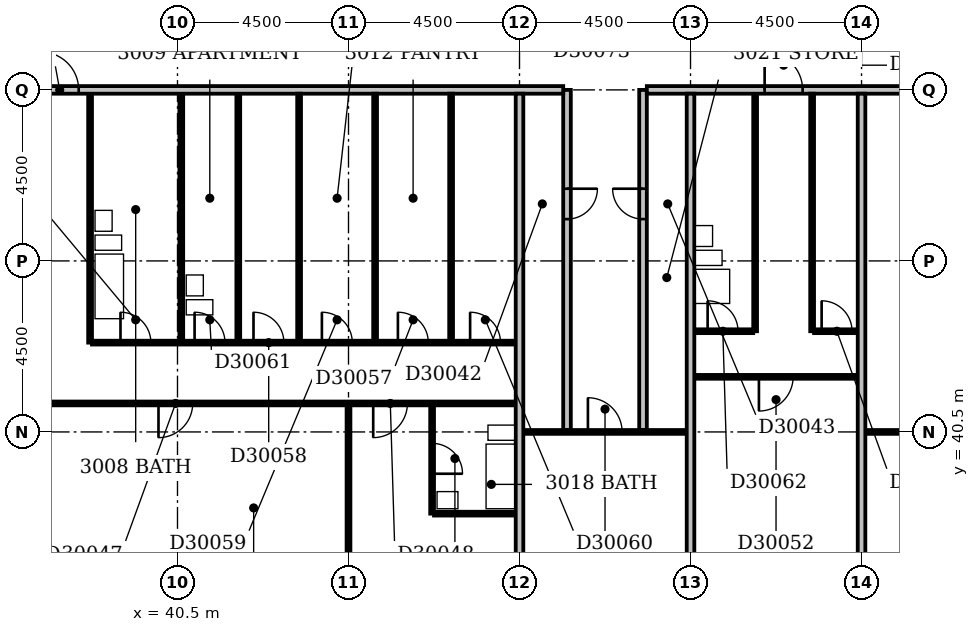
"""IFC4 building model, lengths in metres.
Left out: names, types, materials, properties, quantities, classifications, styles, units other than length and angle.
Written with IfcOpenShell. Run it as: python <this file> out.ifc"""

import sys

from ifc_helpers import new_model, si_unit, direction, frame, frame_2d, origin, place, context, subcontext, project, spatial, rectangle, extrude, element, fill, save


model = new_model("IFC4")
c1 = context("Model", 3, precision=1e-05, world=origin(), true_north=direction((0.0, 1.0)))
c2 = subcontext(c1, "Body", "Model", "MODEL_VIEW")
j1 = project(units=[si_unit("LENGTHUNIT", "METRE"), si_unit("PLANEANGLEUNIT", "RADIAN")], contexts=[c1])
p1 = place(None, origin())
s1 = spatial("IfcSite", under=j1, at=p1, CompositionType="ELEMENT")
p2 = place(p1, origin())
s2 = spatial("IfcBuilding", under=s1, at=p2, CompositionType="ELEMENT")
p3 = place(p2, frame((0.0, 0.0, 123.2)))
s3 = spatial("IfcBuildingStorey", under=s2, at=p3, CompositionType="ELEMENT", Elevation=123.2)
p4 = place(p3, frame((45.0, 36.5, 0.0), z_axis=(0.0, 0.0, 1.0), x_axis=(0.0, 1.0, 0.0)))
e1 = element("IfcWall", 1, at=p4, inside=s3, PredefinedType="PARTITIONING", context=c2, shape_type="SweptSolid", body=[
    extrude(rectangle(XDim=4.7, YDim=0.1, at=frame_2d((2.35, 0.0))), origin(), (0.0, 0.0, 1.0), 2.6),
])
p5 = place(p3, frame((49.5, 36.5, 0.0), z_axis=(0.0, 0.0, 1.0), x_axis=(0.0, 1.0, 0.0)))
e2 = element("IfcWall", 2, at=p5, inside=s3, PredefinedType="PARTITIONING", context=c2, shape_type="SweptSolid", body=[
    extrude(rectangle(XDim=12.9, YDim=0.2, at=frame_2d((6.45, 0.0))), origin(), (0.0, 0.0, 1.0), 3.3),
])
p6 = place(p3, frame((54.0, 36.5, 0.0), z_axis=(0.0, 0.0, 1.0), x_axis=(0.0, 1.0, 0.0)))
e3 = element("IfcWall", 3, at=p6, inside=s3, PredefinedType="PARTITIONING", context=c2, shape_type="SweptSolid", body=[
    extrude(rectangle(XDim=12.9, YDim=0.2, at=frame_2d((6.45, 0.0))), origin(), (0.0, 0.0, 1.0), 2.6),
])
p7 = place(p3, frame((58.5, 36.5, 0.0), z_axis=(0.0, 0.0, 1.0), x_axis=(0.0, 1.0, 0.0)))
e4 = element("IfcWall", 4, at=p7, inside=s3, PredefinedType="PARTITIONING", context=c2, shape_type="SweptSolid", body=[
    extrude(rectangle(XDim=12.9, YDim=0.2, at=frame_2d((6.45, 0.0))), origin(), (0.0, 0.0, 1.0), 3.3),
])
p8 = place(p3, frame((47.2, 38.35, 0.0), z_axis=(0.0, 0.0, 1.0), x_axis=(0.0, 1.0, 0.0)))
e5 = element("IfcWall", 5, at=p8, inside=s3, PredefinedType="PLUMBINGWALL", context=c2, shape_type="SweptSolid", body=[
    extrude(rectangle(XDim=2.85, YDim=0.1, at=frame_2d((1.425, 0.0))), origin(), (0.0, 0.0, 1.0), 3.3),
])
p9 = place(p8, frame((1.05, 0.0, 0.0)))
e6 = element("IfcOpeningElement", 6, at=p9, cuts=e5, PredefinedType="OPENING", context=c2, shape_type="SweptSolid", body=[
    extrude(rectangle(XDim=0.8, YDim=2.1, at=frame_2d((0.4, 1.05))), frame((0.0, 0.062, 0.0), z_axis=(0.0, -1.0, 0.0), x_axis=(1.0, 0.0, 0.0)), (0.0, 0.0, 1.0), 0.124),
])
p10 = place(p3, frame((47.25, 38.35, 0.0), z_axis=(0.0, 0.0, 1.0), x_axis=(1.0, 0.0, 0.0)))
e7 = element("IfcWall", 7, at=p10, inside=s3, PredefinedType="PLUMBINGWALL", context=c2, shape_type="SweptSolid", body=[
    extrude(rectangle(XDim=2.15, YDim=0.1, at=frame_2d((1.075, 0.0))), origin(), (0.0, 0.0, 1.0), 3.3),
])
p11 = place(p3, frame((49.6, 40.5, 0.0), z_axis=(0.0, 0.0, 1.0), x_axis=(1.0, 0.0, 0.0)))
e8 = element("IfcWall", 8, at=p11, inside=s3, PredefinedType="PARTITIONING", context=c2, shape_type="SweptSolid", body=[
    extrude(rectangle(XDim=4.3, YDim=0.1, at=frame_2d((2.15, 0.0))), origin(), (0.0, 0.0, 1.0), 3.3),
])
p12 = place(p11, frame((1.7, 0.0, 0.0)))
e9 = element("IfcOpeningElement", 9, at=p12, cuts=e8, PredefinedType="OPENING", context=c2, shape_type="SweptSolid", body=[
    extrude(rectangle(XDim=0.9, YDim=2.1, at=frame_2d((0.45, 1.05))), frame((0.0, 0.062, 0.0), z_axis=(0.0, -1.0, 0.0), x_axis=(1.0, 0.0, 0.0)), (0.0, 0.0, 1.0), 0.124),
])
p13 = place(p3, frame((58.6, 40.5, 0.0), z_axis=(0.0, 0.0, 1.0), x_axis=(1.0, 0.0, 0.0)))
e10 = element("IfcWall", 10, at=p13, inside=s3, PredefinedType="PARTITIONING", context=c2, shape_type="SweptSolid", body=[
    extrude(rectangle(XDim=4.3, YDim=0.1, at=frame_2d((2.15, 0.0))), origin(), (0.0, 0.0, 1.0), 3.3),
])
p14 = place(p13, frame((1.7, 0.0, 0.0)))
e11 = element("IfcOpeningElement", 11, at=p14, cuts=e10, PredefinedType="OPENING", context=c2, shape_type="SweptSolid", body=[
    extrude(rectangle(XDim=0.9, YDim=2.1, at=frame_2d((0.45, 1.05))), frame((0.0, 0.062, 0.0), z_axis=(0.0, -1.0, 0.0), x_axis=(1.0, 0.0, 0.0)), (0.0, 0.0, 1.0), 0.124),
])
p15 = place(p3, frame((50.75, 40.55, 0.0), z_axis=(0.0, 0.0, 1.0), x_axis=(0.0, 1.0, 0.0)))
e12 = element("IfcWall", 12, at=p15, inside=s3, PredefinedType="PARTITIONING", context=c2, shape_type="SweptSolid", body=[
    extrude(rectangle(XDim=8.95, YDim=0.2, at=frame_2d((4.475, 0.0))), origin(), (0.0, 0.0, 1.0), 3.3),
])
p16 = place(p15, frame((5.55, 0.0, 0.0)))
e13 = element("IfcOpeningElement", 13, at=p16, cuts=e12, PredefinedType="OPENING", context=c2, shape_type="SweptSolid", body=[
    extrude(rectangle(XDim=0.8, YDim=2.1, at=frame_2d((0.4, 1.05))), frame((0.0, 0.112, 0.0), z_axis=(0.0, -1.0, 0.0), x_axis=(1.0, 0.0, 0.0)), (0.0, 0.0, 1.0), 0.224),
])
p17 = place(p3, frame((52.75, 40.55, 0.0), z_axis=(0.0, 0.0, 1.0), x_axis=(0.0, 1.0, 0.0)))
e14 = element("IfcWall", 14, at=p17, inside=s3, PredefinedType="PARTITIONING", context=c2, shape_type="SweptSolid", body=[
    extrude(rectangle(XDim=8.95, YDim=0.2, at=frame_2d((4.475, 0.0))), origin(), (0.0, 0.0, 1.0), 3.3),
])
p18 = place(p17, frame((5.55, 0.0, 0.0)))
e15 = element("IfcOpeningElement", 15, at=p18, cuts=e14, PredefinedType="OPENING", context=c2, shape_type="SweptSolid", body=[
    extrude(rectangle(XDim=0.8, YDim=2.1, at=frame_2d((0.4, 1.05))), frame((0.0, 0.112, 0.0), z_axis=(0.0, -1.0, 0.0), x_axis=(1.0, 0.0, 0.0)), (0.0, 0.0, 1.0), 0.224),
])
p19 = place(p3, frame((31.6, 41.25, 0.0), z_axis=(0.0, 0.0, 1.0), x_axis=(1.0, 0.0, 0.0)))
e16 = element("IfcWall", 16, at=p19, inside=s3, PredefinedType="PARTITIONING", context=c2, shape_type="SweptSolid", body=[
    extrude(rectangle(XDim=17.8, YDim=0.1, at=frame_2d((8.9, 0.0))), origin(), (0.0, 0.0, 1.0), 3.3),
])
p20 = place(p19, frame((2.85, 0.0, 0.0)))
e17 = element("IfcOpeningElement", 17, at=p20, cuts=e16, PredefinedType="OPENING", context=c2, shape_type="SweptSolid", body=[
    extrude(rectangle(XDim=0.9, YDim=2.1, at=frame_2d((0.45, 1.05))), frame((0.0, 0.062, 0.0), z_axis=(0.0, -1.0, 0.0), x_axis=(1.0, 0.0, 0.0)), (0.0, 0.0, 1.0), 0.124),
])
p21 = place(p19, frame((8.4, 0.0, 0.0)))
e18 = element("IfcOpeningElement", 18, at=p21, cuts=e16, PredefinedType="OPENING", context=c2, shape_type="SweptSolid", body=[
    extrude(rectangle(XDim=0.9, YDim=2.1, at=frame_2d((0.45, 1.05))), frame((0.0, 0.062, 0.0), z_axis=(0.0, -1.0, 0.0), x_axis=(1.0, 0.0, 0.0)), (0.0, 0.0, 1.0), 0.124),
])
p22 = place(p19, frame((14.05, 0.0, 0.0)))
e19 = element("IfcOpeningElement", 19, at=p22, cuts=e16, PredefinedType="OPENING", context=c2, shape_type="SweptSolid", body=[
    extrude(rectangle(XDim=0.9, YDim=2.1, at=frame_2d((0.45, 1.05))), frame((0.0, 0.062, 0.0), z_axis=(0.0, -1.0, 0.0), x_axis=(1.0, 0.0, 0.0)), (0.0, 0.0, 1.0), 0.124),
])
p23 = place(p3, frame((54.1, 41.95, 0.0), z_axis=(0.0, 0.0, 1.0), x_axis=(1.0, 0.0, 0.0)))
e20 = element("IfcWall", 20, at=p23, inside=s3, PredefinedType="PARTITIONING", context=c2, shape_type="SweptSolid", body=[
    extrude(rectangle(XDim=4.3, YDim=0.1, at=frame_2d((2.15, 0.0))), origin(), (0.0, 0.0, 1.0), 3.3),
])
p24 = place(p23, frame((1.7, 0.0, 0.0)))
e21 = element("IfcOpeningElement", 21, at=p24, cuts=e20, PredefinedType="OPENING", context=c2, shape_type="SweptSolid", body=[
    extrude(rectangle(XDim=0.9, YDim=2.1, at=frame_2d((0.45, 1.05))), frame((0.0, 0.062, 0.0), z_axis=(0.0, -1.0, 0.0), x_axis=(1.0, 0.0, 0.0)), (0.0, 0.0, 1.0), 0.124),
])
p25 = place(p3, frame((38.2, 42.85, 0.0), z_axis=(0.0, 0.0, 1.0), x_axis=(0.0, 1.0, 0.0)))
e22 = element("IfcWall", 22, at=p25, inside=s3, PredefinedType="PLUMBINGWALL", context=c2, shape_type="SweptSolid", body=[
    extrude(rectangle(XDim=6.55, YDim=0.1, at=frame_2d((3.275, 0.0))), origin(), (0.0, 0.0, 1.0), 3.3),
])
p26 = place(p3, frame((38.25, 42.85, 0.0), z_axis=(0.0, 0.0, 1.0), x_axis=(1.0, 0.0, 0.0)))
e23 = element("IfcWall", 23, at=p26, inside=s3, PredefinedType="PARTITIONING", context=c2, shape_type="SweptSolid", body=[
    extrude(rectangle(XDim=11.15, YDim=0.1, at=frame_2d((5.575, 0.0))), origin(), (0.0, 0.0, 1.0), 3.3),
])
p27 = place(p26, frame((0.75, 0.0, 0.0)))
e24 = element("IfcOpeningElement", 24, at=p27, cuts=e23, PredefinedType="OPENING", context=c2, shape_type="SweptSolid", body=[
    extrude(rectangle(XDim=0.8, YDim=2.1, at=frame_2d((0.4, 1.05))), frame((0.0, 0.062, 0.0), z_axis=(0.0, -1.0, 0.0), x_axis=(1.0, 0.0, 0.0)), (0.0, 0.0, 1.0), 0.124),
])
p28 = place(p26, frame((8.05, 0.0, 0.0)))
e25 = element("IfcOpeningElement", 25, at=p28, cuts=e23, PredefinedType="OPENING", context=c2, shape_type="SweptSolid", body=[
    extrude(rectangle(XDim=0.8, YDim=2.1, at=frame_2d((0.4, 1.05))), frame((0.0, 0.062, 0.0), z_axis=(0.0, -1.0, 0.0), x_axis=(1.0, 0.0, 0.0)), (0.0, 0.0, 1.0), 0.124),
])
p29 = place(p26, frame((4.25, 0.0, 0.0)))
e26 = element("IfcOpeningElement", 26, at=p29, cuts=e23, PredefinedType="OPENING", context=c2, shape_type="SweptSolid", body=[
    extrude(rectangle(XDim=0.8, YDim=2.1, at=frame_2d((0.4, 1.05))), frame((0.0, 0.062, 0.0), z_axis=(0.0, -1.0, 0.0), x_axis=(1.0, 0.0, 0.0)), (0.0, 0.0, 1.0), 0.124),
])
p30 = place(p26, frame((6.05, 0.0, 0.0)))
e27 = element("IfcOpeningElement", 27, at=p30, cuts=e23, PredefinedType="OPENING", context=c2, shape_type="SweptSolid", body=[
    extrude(rectangle(XDim=0.8, YDim=2.1, at=frame_2d((0.4, 1.05))), frame((0.0, 0.062, 0.0), z_axis=(0.0, -1.0, 0.0), x_axis=(1.0, 0.0, 0.0)), (0.0, 0.0, 1.0), 0.124),
])
p31 = place(p26, frame((9.95, 0.0, 0.0)))
e28 = element("IfcOpeningElement", 28, at=p31, cuts=e23, PredefinedType="OPENING", context=c2, shape_type="SweptSolid", body=[
    extrude(rectangle(XDim=0.8, YDim=2.1, at=frame_2d((0.4, 1.05))), frame((0.0, 0.062, 0.0), z_axis=(0.0, -1.0, 0.0), x_axis=(1.0, 0.0, 0.0)), (0.0, 0.0, 1.0), 0.124),
])
p32 = place(p26, frame((2.7, 0.0, 0.0)))
e29 = element("IfcOpeningElement", 29, at=p32, cuts=e23, PredefinedType="OPENING", context=c2, shape_type="SweptSolid", body=[
    extrude(rectangle(XDim=0.8, YDim=2.1, at=frame_2d((0.4, 1.05))), frame((0.0, 0.062, 0.0), z_axis=(0.0, -1.0, 0.0), x_axis=(1.0, 0.0, 0.0)), (0.0, 0.0, 1.0), 0.124),
])
for number, where, z_axis, x_axis in (
    (30, (40.6, 42.9, 0.0), (0.0, 0.0, 1.0), (0.0, 1.0, 0.0)),
    (31, (42.1, 42.9, 0.0), (0.0, 0.0, 1.0), (0.0, 1.0, 0.0)),
):
    element("IfcWall", number, at=place(p3, frame(where, z_axis=z_axis, x_axis=x_axis)), inside=s3, PredefinedType="PLUMBINGWALL", context=c2, shape_type="SweptSolid", body=[
        extrude(rectangle(XDim=6.5, YDim=0.1, at=frame_2d((3.25, 0.0))), origin(), (0.0, 0.0, 1.0), 3.3),
    ])
p33 = place(p3, frame((43.7, 42.9, 0.0), z_axis=(0.0, 0.0, 1.0), x_axis=(0.0, 1.0, 0.0)))
e32 = element("IfcWall", 32, at=p33, inside=s3, PredefinedType="PARTITIONING", context=c2, shape_type="SweptSolid", body=[
    extrude(rectangle(XDim=6.5, YDim=0.1, at=frame_2d((3.25, 0.0))), origin(), (0.0, 0.0, 1.0), 3.3),
])
p34 = place(p3, frame((45.7, 42.9, 0.0), z_axis=(0.0, 0.0, 1.0), x_axis=(0.0, 1.0, 0.0)))
e33 = element("IfcWall", 33, at=p34, inside=s3, PredefinedType="PARTITIONING", context=c2, shape_type="SweptSolid", body=[
    extrude(rectangle(XDim=6.5, YDim=0.1, at=frame_2d((3.25, 0.0))), origin(), (0.0, 0.0, 1.0), 2.6),
])
p35 = place(p3, frame((47.7, 42.9, 0.0), z_axis=(0.0, 0.0, 1.0), x_axis=(0.0, 1.0, 0.0)))
e34 = element("IfcWall", 34, at=p35, inside=s3, PredefinedType="PARTITIONING", context=c2, shape_type="SweptSolid", body=[
    extrude(rectangle(XDim=6.5, YDim=0.1, at=frame_2d((3.25, 0.0))), origin(), (0.0, 0.0, 1.0), 3.3),
])
p36 = place(p3, frame((54.1, 43.15, 0.0), z_axis=(0.0, 0.0, 1.0), x_axis=(1.0, 0.0, 0.0)))
e35 = element("IfcWall", 35, at=p36, inside=s3, PredefinedType="PARTITIONING", context=c2, shape_type="SweptSolid", body=[
    extrude(rectangle(XDim=1.55, YDim=0.1, at=frame_2d((0.775, 0.0))), origin(), (0.0, 0.0, 1.0), 3.3),
])
p37 = place(p36, frame((0.35, 0.0, 0.0)))
e36 = element("IfcOpeningElement", 36, at=p37, cuts=e35, PredefinedType="OPENING", context=c2, shape_type="SweptSolid", body=[
    extrude(rectangle(XDim=0.8, YDim=2.1, at=frame_2d((0.4, 1.05))), frame((0.0, 0.062, 0.0), z_axis=(0.0, -1.0, 0.0), x_axis=(1.0, 0.0, 0.0)), (0.0, 0.0, 1.0), 0.124),
])
p38 = place(p3, frame((55.7, 43.15, 0.0), z_axis=(0.0, 0.0, 1.0), x_axis=(0.0, 1.0, 0.0)))
e37 = element("IfcWall", 37, at=p38, inside=s3, PredefinedType="PLUMBINGWALL", context=c2, shape_type="SweptSolid", body=[
    extrude(rectangle(XDim=6.25, YDim=0.1, at=frame_2d((3.125, 0.0))), origin(), (0.0, 0.0, 1.0), 3.3),
])
p39 = place(p3, frame((57.2, 43.15, 0.0), z_axis=(0.0, 0.0, 1.0), x_axis=(0.0, 1.0, 0.0)))
e38 = element("IfcWall", 38, at=p39, inside=s3, PredefinedType="PARTITIONING", context=c2, shape_type="SweptSolid", body=[
    extrude(rectangle(XDim=6.25, YDim=0.1, at=frame_2d((3.125, 0.0))), origin(), (0.0, 0.0, 1.0), 3.3),
])
p40 = place(p3, frame((57.25, 43.15, 0.0), z_axis=(0.0, 0.0, 1.0), x_axis=(1.0, 0.0, 0.0)))
e39 = element("IfcWall", 39, at=p40, inside=s3, PredefinedType="PARTITIONING", context=c2, shape_type="SweptSolid", body=[
    extrude(rectangle(XDim=1.15, YDim=0.1, at=frame_2d((0.575, 0.0))), origin(), (0.0, 0.0, 1.0), 3.3),
])
p41 = place(p40, frame((0.2, 0.0, 0.0)))
e40 = element("IfcOpeningElement", 40, at=p41, cuts=e39, PredefinedType="OPENING", context=c2, shape_type="SweptSolid", body=[
    extrude(rectangle(XDim=0.8, YDim=2.1, at=frame_2d((0.4, 1.05))), frame((0.0, 0.062, 0.0), z_axis=(0.0, -1.0, 0.0), x_axis=(1.0, 0.0, 0.0)), (0.0, 0.0, 1.0), 0.124),
])
p42 = place(p3, frame((9.1, 49.5, 0.0), z_axis=(0.0, 0.0, 1.0), x_axis=(1.0, 0.0, 0.0)))
e41 = element("IfcWall", 41, at=p42, inside=s3, PredefinedType="PARTITIONING", context=c2, shape_type="SweptSolid", body=[
    extrude(rectangle(XDim=41.55, YDim=0.2, at=frame_2d((20.775, 0.0))), origin(), (0.0, 0.0, 1.0), 3.3),
])
p43 = place(p42, frame((13.7, 0.0, 0.0)))
e42 = element("IfcOpeningElement", 42, at=p43, cuts=e41, PredefinedType="OPENING", context=c2, shape_type="SweptSolid", body=[
    extrude(rectangle(XDim=1.0, YDim=2.1, at=frame_2d((0.5, 1.05))), frame((0.0, 0.112, 0.0), z_axis=(0.0, -1.0, 0.0), x_axis=(1.0, 0.0, 0.0)), (0.0, 0.0, 1.0), 0.224),
])
p44 = place(p42, frame((27.8, 0.0, 0.0)))
e43 = element("IfcOpeningElement", 43, at=p44, cuts=e41, PredefinedType="OPENING", context=c2, shape_type="SweptSolid", body=[
    extrude(rectangle(XDim=1.0, YDim=2.1, at=frame_2d((0.5, 1.05))), frame((0.0, 0.112, 0.0), z_axis=(0.0, -1.0, 0.0), x_axis=(1.0, 0.0, 0.0)), (0.0, 0.0, 1.0), 0.224),
])
p45 = place(p42, frame((8.4, 0.0, 0.0)))
e44 = element("IfcOpeningElement", 44, at=p45, cuts=e41, PredefinedType="OPENING", context=c2, shape_type="SweptSolid", body=[
    extrude(rectangle(XDim=0.9, YDim=2.1, at=frame_2d((0.45, 1.05))), frame((0.0, 0.112, 0.0), z_axis=(0.0, -1.0, 0.0), x_axis=(1.0, 0.0, 0.0)), (0.0, 0.0, 1.0), 0.224),
])
p46 = place(p3, frame((52.85, 49.5, 0.0), z_axis=(0.0, 0.0, 1.0), x_axis=(1.0, 0.0, 0.0)))
e45 = element("IfcWall", 45, at=p46, inside=s3, PredefinedType="PARTITIONING", context=c2, shape_type="SweptSolid", body=[
    extrude(rectangle(XDim=6.8, YDim=0.2, at=frame_2d((3.4, 0.0))), origin(), (0.0, 0.0, 1.0), 3.3),
])
p47 = place(p46, frame((3.1, 0.0, 0.0)))
e46 = element("IfcOpeningElement", 46, at=p47, cuts=e45, PredefinedType="OPENING", context=c2, shape_type="SweptSolid", body=[
    extrude(rectangle(XDim=1.0, YDim=2.1, at=frame_2d((0.5, 1.05))), frame((0.0, 0.112, 0.0), z_axis=(0.0, -1.0, 0.0), x_axis=(1.0, 0.0, 0.0)), (0.0, 0.0, 1.0), 0.224),
])
p48 = place(p9, frame((0.8, 0.0, 0.0), z_axis=(0.0, 0.0, 1.0), x_axis=(-1.0, 0.0, 0.0)))
e47 = element("IfcDoor", 47, at=p48, inside=s3, OperationType="SINGLE_SWING_RIGHT", PredefinedType="DOOR", context=c2, shape_type="SweptSolid", body=[
    extrude(rectangle(XDim=0.8, YDim=2.1, at=frame_2d((0.4, 1.05))), frame((0.0, 0.025, 0.0), z_axis=(0.0, -1.0, 0.0), x_axis=(1.0, 0.0, 0.0)), (0.0, 0.0, 1.0), 0.05),
])
fill(e6, e47)
p49 = place(p12, origin())
e48 = element("IfcDoor", 48, at=p49, inside=s3, OperationType="SINGLE_SWING_LEFT", PredefinedType="DOOR", context=c2, shape_type="SweptSolid", body=[
    extrude(rectangle(XDim=0.9, YDim=2.1, at=frame_2d((0.45, 1.05))), frame((0.0, 0.025, 0.0), z_axis=(0.0, -1.0, 0.0), x_axis=(1.0, 0.0, 0.0)), (0.0, 0.0, 1.0), 0.05),
])
fill(e9, e48)
p50 = place(p16, origin())
e49 = element("IfcDoor", 49, at=p50, inside=s3, OperationType="SINGLE_SWING_RIGHT", PredefinedType="DOOR", context=c2, shape_type="SweptSolid", body=[
    extrude(rectangle(XDim=0.8, YDim=2.1, at=frame_2d((0.4, 1.05))), frame((0.0, 0.025, 0.0), z_axis=(0.0, -1.0, 0.0), x_axis=(1.0, 0.0, 0.0)), (0.0, 0.0, 1.0), 0.05),
])
fill(e13, e49)
p51 = place(p18, frame((0.8, 0.0, 0.0), z_axis=(0.0, 0.0, 1.0), x_axis=(-1.0, 0.0, 0.0)))
e50 = element("IfcDoor", 50, at=p51, inside=s3, OperationType="SINGLE_SWING_LEFT", PredefinedType="DOOR", context=c2, shape_type="SweptSolid", body=[
    extrude(rectangle(XDim=0.8, YDim=2.1, at=frame_2d((0.4, 1.05))), frame((0.0, 0.025, 0.0), z_axis=(0.0, -1.0, 0.0), x_axis=(1.0, 0.0, 0.0)), (0.0, 0.0, 1.0), 0.05),
])
fill(e15, e50)
p52 = place(p21, frame((0.9, 0.0, 0.0), z_axis=(0.0, 0.0, 1.0), x_axis=(-1.0, 0.0, 0.0)))
e51 = element("IfcDoor", 51, at=p52, inside=s3, OperationType="SINGLE_SWING_RIGHT", PredefinedType="DOOR", context=c2, shape_type="SweptSolid", body=[
    extrude(rectangle(XDim=0.9, YDim=2.1, at=frame_2d((0.45, 1.05))), frame((0.0, 0.025, 0.0), z_axis=(0.0, -1.0, 0.0), x_axis=(1.0, 0.0, 0.0)), (0.0, 0.0, 1.0), 0.05),
])
fill(e18, e51)
p53 = place(p22, frame((0.9, 0.0, 0.0), z_axis=(0.0, 0.0, 1.0), x_axis=(-1.0, 0.0, 0.0)))
e52 = element("IfcDoor", 52, at=p53, inside=s3, OperationType="SINGLE_SWING_RIGHT", PredefinedType="DOOR", context=c2, shape_type="SweptSolid", body=[
    extrude(rectangle(XDim=0.9, YDim=2.1, at=frame_2d((0.45, 1.05))), frame((0.0, 0.025, 0.0), z_axis=(0.0, -1.0, 0.0), x_axis=(1.0, 0.0, 0.0)), (0.0, 0.0, 1.0), 0.05),
])
fill(e19, e52)
p54 = place(p24, frame((0.9, 0.0, 0.0), z_axis=(0.0, 0.0, 1.0), x_axis=(-1.0, 0.0, 0.0)))
e53 = element("IfcDoor", 53, at=p54, inside=s3, OperationType="SINGLE_SWING_RIGHT", PredefinedType="DOOR", context=c2, shape_type="SweptSolid", body=[
    extrude(rectangle(XDim=0.9, YDim=2.1, at=frame_2d((0.45, 1.05))), frame((0.0, 0.025, 0.0), z_axis=(0.0, -1.0, 0.0), x_axis=(1.0, 0.0, 0.0)), (0.0, 0.0, 1.0), 0.05),
])
fill(e21, e53)
p55 = place(p27, origin())
e54 = element("IfcDoor", 54, at=p55, inside=s3, OperationType="SINGLE_SWING_LEFT", PredefinedType="DOOR", context=c2, shape_type="SweptSolid", body=[
    extrude(rectangle(XDim=0.8, YDim=2.1, at=frame_2d((0.4, 1.05))), frame((0.0, 0.025, 0.0), z_axis=(0.0, -1.0, 0.0), x_axis=(1.0, 0.0, 0.0)), (0.0, 0.0, 1.0), 0.05),
])
fill(e24, e54)
p56 = place(p28, origin())
e55 = element("IfcDoor", 55, at=p56, inside=s3, OperationType="SINGLE_SWING_LEFT", PredefinedType="DOOR", context=c2, shape_type="SweptSolid", body=[
    extrude(rectangle(XDim=0.8, YDim=2.1, at=frame_2d((0.4, 1.05))), frame((0.0, 0.025, 0.0), z_axis=(0.0, -1.0, 0.0), x_axis=(1.0, 0.0, 0.0)), (0.0, 0.0, 1.0), 0.05),
])
fill(e25, e55)
p57 = place(p29, origin())
e56 = element("IfcDoor", 56, at=p57, inside=s3, OperationType="SINGLE_SWING_LEFT", PredefinedType="DOOR", context=c2, shape_type="SweptSolid", body=[
    extrude(rectangle(XDim=0.8, YDim=2.1, at=frame_2d((0.4, 1.05))), frame((0.0, 0.025, 0.0), z_axis=(0.0, -1.0, 0.0), x_axis=(1.0, 0.0, 0.0)), (0.0, 0.0, 1.0), 0.05),
])
fill(e26, e56)
p58 = place(p30, origin())
e57 = element("IfcDoor", 57, at=p58, inside=s3, OperationType="SINGLE_SWING_LEFT", PredefinedType="DOOR", context=c2, shape_type="SweptSolid", body=[
    extrude(rectangle(XDim=0.8, YDim=2.1, at=frame_2d((0.4, 1.05))), frame((0.0, 0.025, 0.0), z_axis=(0.0, -1.0, 0.0), x_axis=(1.0, 0.0, 0.0)), (0.0, 0.0, 1.0), 0.05),
])
fill(e27, e57)
p59 = place(p31, origin())
e58 = element("IfcDoor", 58, at=p59, inside=s3, OperationType="SINGLE_SWING_LEFT", PredefinedType="DOOR", context=c2, shape_type="SweptSolid", body=[
    extrude(rectangle(XDim=0.8, YDim=2.1, at=frame_2d((0.4, 1.05))), frame((0.0, 0.025, 0.0), z_axis=(0.0, -1.0, 0.0), x_axis=(1.0, 0.0, 0.0)), (0.0, 0.0, 1.0), 0.05),
])
fill(e28, e58)
p60 = place(p32, origin())
e59 = element("IfcDoor", 59, at=p60, inside=s3, OperationType="SINGLE_SWING_LEFT", PredefinedType="DOOR", context=c2, shape_type="SweptSolid", body=[
    extrude(rectangle(XDim=0.8, YDim=2.1, at=frame_2d((0.4, 1.05))), frame((0.0, 0.025, 0.0), z_axis=(0.0, -1.0, 0.0), x_axis=(1.0, 0.0, 0.0)), (0.0, 0.0, 1.0), 0.05),
])
fill(e29, e59)
p61 = place(p37, origin())
e60 = element("IfcDoor", 60, at=p61, inside=s3, OperationType="SINGLE_SWING_LEFT", PredefinedType="DOOR", context=c2, shape_type="SweptSolid", body=[
    extrude(rectangle(XDim=0.8, YDim=2.1, at=frame_2d((0.4, 1.05))), frame((0.0, 0.025, 0.0), z_axis=(0.0, -1.0, 0.0), x_axis=(1.0, 0.0, 0.0)), (0.0, 0.0, 1.0), 0.05),
])
fill(e36, e60)
p62 = place(p41, origin())
e61 = element("IfcDoor", 61, at=p62, inside=s3, OperationType="SINGLE_SWING_LEFT", PredefinedType="DOOR", context=c2, shape_type="SweptSolid", body=[
    extrude(rectangle(XDim=0.8, YDim=2.1, at=frame_2d((0.4, 1.05))), frame((0.0, 0.025, 0.0), z_axis=(0.0, -1.0, 0.0), x_axis=(1.0, 0.0, 0.0)), (0.0, 0.0, 1.0), 0.05),
])
fill(e40, e61)
p63 = place(p44, origin())
e62 = element("IfcDoor", 62, at=p63, inside=s3, OperationType="SINGLE_SWING_LEFT", PredefinedType="DOOR", context=c2, shape_type="SweptSolid", body=[
    extrude(rectangle(XDim=1.0, YDim=2.1, at=frame_2d((0.5, 1.05))), frame((0.0, 0.025, 0.0), z_axis=(0.0, -1.0, 0.0), x_axis=(1.0, 0.0, 0.0)), (0.0, 0.0, 1.0), 0.05),
])
fill(e43, e62)
p64 = place(p47, origin())
e63 = element("IfcDoor", 63, at=p64, inside=s3, OperationType="SINGLE_SWING_LEFT", PredefinedType="DOOR", context=c2, shape_type="SweptSolid", body=[
    extrude(rectangle(XDim=1.0, YDim=2.1, at=frame_2d((0.5, 1.05))), frame((0.0, 0.025, 0.0), z_axis=(0.0, -1.0, 0.0), x_axis=(1.0, 0.0, 0.0)), (0.0, 0.0, 1.0), 0.05),
])
fill(e46, e63)
save(model, sys.argv[1])
